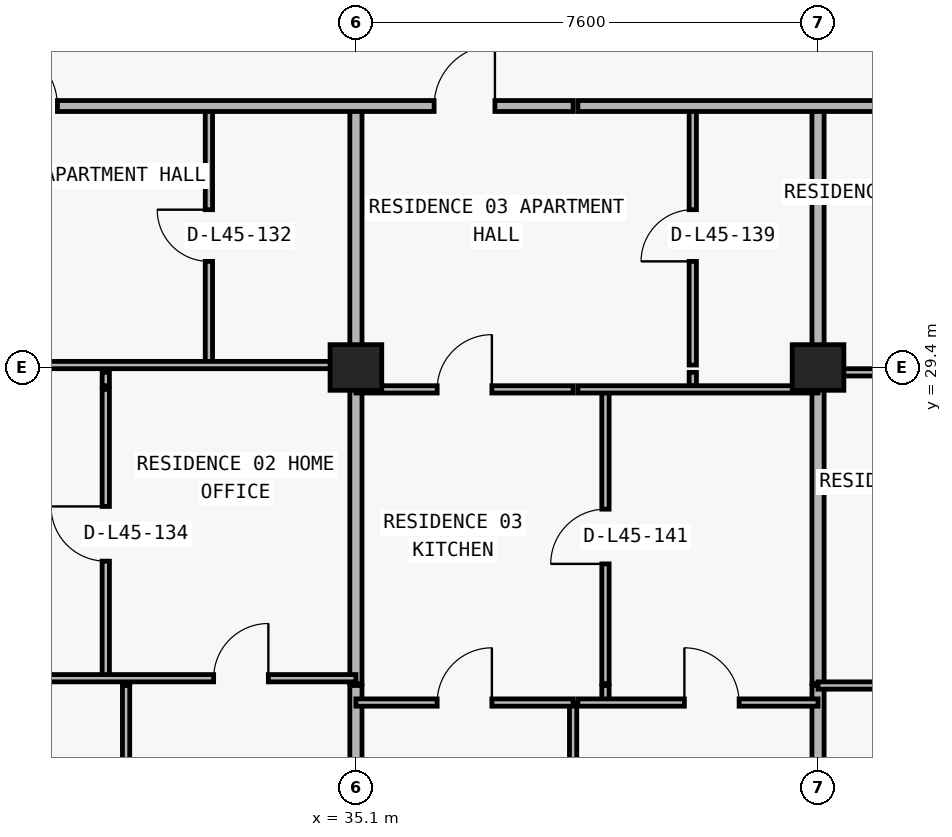
"""IFC4 building model, lengths in metres.
Left out: names, types, materials, properties, quantities, classifications, styles, units other than length and angle.
Written with IfcOpenShell. Run it as: python <this file> out.ifc"""

import sys

from ifc_helpers import new_model, si_unit, direction, frame, frame_2d, origin, origin_2d, place, context, subcontext, project, spatial, rectangle, extrude, element, fill, save


model = new_model("IFC4")
c1 = context("Model", 3, precision=1e-05, world=origin(), true_north=direction((0.0, 1.0)))
c2 = subcontext(c1, "Body", "Model", "MODEL_VIEW")
j1 = project(units=[si_unit("LENGTHUNIT", "METRE"), si_unit("PLANEANGLEUNIT", "RADIAN")], contexts=[c1])
p1 = place(None, origin())
s1 = spatial("IfcSite", under=j1, at=p1, CompositionType="ELEMENT")
p2 = place(p1, origin())
s2 = spatial("IfcBuilding", under=s1, at=p2, CompositionType="ELEMENT")
p3 = place(p2, frame((0.0, 0.0, 163.8)))
s3 = spatial("IfcBuildingStorey", under=s2, at=p3, CompositionType="ELEMENT", Elevation=163.8)
for number, where, z_axis, x_axis in (
    (1, (35.1, 29.4, 0.0), (0.0, 0.0, 1.0), (1.0, 0.0, 0.0)),
    (2, (42.7, 29.4, 0.0), (0.0, 0.0, 1.0), (1.0, 0.0, 0.0)),
):
    element("IfcColumn", number, at=place(p3, frame(where, z_axis=z_axis, x_axis=x_axis)), inside=s3, PredefinedType="COLUMN", context=c2, shape_type="SweptSolid", body=[
        extrude(rectangle(XDim=0.85, YDim=0.75, at=origin_2d()), origin(), (0.0, 0.0, 1.0), 3.05),
    ])
p4 = place(p3, frame((30.986, 24.29, 0.0), z_axis=(0.0, 0.0, 1.0), x_axis=(0.0, 1.0, 0.0)))
e3 = element("IfcWall", 3, at=p4, inside=s3, PredefinedType="PARTITIONING", context=c2, shape_type="SweptSolid", body=[
    extrude(rectangle(XDim=4.75, YDim=0.12, at=frame_2d((2.375, 0.0))), origin(), (0.0, 0.0, 1.0), 2.499),
])
p5 = place(p4, frame((1.925, 0.0, 0.0)))
e4 = element("IfcOpeningElement", 4, at=p5, cuts=e3, PredefinedType="OPENING", context=c2, shape_type="SweptSolid", body=[
    extrude(rectangle(XDim=0.9, YDim=2.15, at=frame_2d((0.45, 1.075))), frame((0.0, 0.07, 0.0), z_axis=(0.0, -1.0, 0.0), x_axis=(1.0, 0.0, 0.0)), (0.0, 0.0, 1.0), 0.14),
])
p6 = place(p3, frame((30.986, 29.1, 0.0), z_axis=(0.0, 0.0, 1.0), x_axis=(0.0, 1.0, 0.0)))
e5 = element("IfcWall", 5, at=p6, inside=s3, PredefinedType="PARTITIONING", context=c2, shape_type="SweptSolid", body=[
    extrude(rectangle(XDim=0.22, YDim=0.12, at=frame_2d((0.11, 0.0))), origin(), (0.0, 0.0, 1.0), 2.499),
])
p7 = place(p3, frame((31.32, 11.24, 0.0), z_axis=(0.0, 0.0, 1.0), x_axis=(0.0, 1.0, 0.0)))
e6 = element("IfcWall", 6, at=p7, inside=s3, PredefinedType="PARTITIONING", context=c2, shape_type="SweptSolid", body=[
    extrude(rectangle(XDim=12.93, YDim=0.12, at=frame_2d((6.465, 0.0))), origin(), (0.0, 0.0, 1.0), 3.05),
])
p8 = place(p3, frame((31.32, 24.2, 0.0), z_axis=(0.0, 0.0, 1.0), x_axis=(0.0, 1.0, 0.0)))
e7 = element("IfcWall", 7, at=p8, inside=s3, PredefinedType="PARTITIONING", context=c2, shape_type="SweptSolid", body=[
    extrude(rectangle(XDim=0.09, YDim=0.12, at=frame_2d((0.045, 0.0))), origin(), (0.0, 0.0, 1.0), 3.05),
])
p9 = place(p3, frame((32.682, 29.44, 0.0), z_axis=(0.0, 0.0, 1.0), x_axis=(0.0, 1.0, 0.0)))
e8 = element("IfcWall", 8, at=p9, inside=s3, PredefinedType="PARTITIONING", context=c2, shape_type="SweptSolid", body=[
    extrude(rectangle(XDim=4.26, YDim=0.12, at=frame_2d((2.13, 0.0))), origin(), (0.0, 0.0, 1.0), 3.05),
])
p10 = place(p9, frame((1.705, 0.0, 0.0)))
e9 = element("IfcOpeningElement", 9, at=p10, cuts=e8, PredefinedType="OPENING", context=c2, shape_type="SweptSolid", body=[
    extrude(rectangle(XDim=0.85, YDim=2.1, at=frame_2d((0.425, 1.05))), frame((0.0, 0.07, 0.0), z_axis=(0.0, -1.0, 0.0), x_axis=(1.0, 0.0, 0.0)), (0.0, 0.0, 1.0), 0.14),
])
p11 = place(p3, frame((35.1, 11.24, 0.0), z_axis=(0.0, 0.0, 1.0), x_axis=(0.0, 1.0, 0.0)))
e10 = element("IfcWall", 10, at=p11, inside=s3, PredefinedType="PARTITIONING", context=c2, shape_type="SweptSolid", body=[
    extrude(rectangle(XDim=12.93, YDim=0.2, at=frame_2d((6.465, 0.0))), origin(), (0.0, 0.0, 1.0), 2.263),
])
p12 = place(p3, frame((35.1, 24.2, 0.0), z_axis=(0.0, 0.0, 1.0), x_axis=(0.0, 1.0, 0.0)))
e11 = element("IfcWall", 11, at=p12, inside=s3, PredefinedType="PARTITIONING", context=c2, shape_type="SweptSolid", body=[
    extrude(rectangle(XDim=4.84, YDim=0.2, at=frame_2d((2.42, 0.0))), origin(), (0.0, 0.0, 1.0), 2.263),
])
p13 = place(p3, frame((35.1, 29.1, 0.0), z_axis=(0.0, 0.0, 1.0), x_axis=(0.0, 1.0, 0.0)))
e12 = element("IfcWall", 12, at=p13, inside=s3, PredefinedType="PARTITIONING", context=c2, shape_type="SweptSolid", body=[
    extrude(rectangle(XDim=0.22, YDim=0.2, at=frame_2d((0.11, 0.0))), origin(), (0.0, 0.0, 1.0), 3.05),
])
p14 = place(p3, frame((35.1, 29.44, 0.0), z_axis=(0.0, 0.0, 1.0), x_axis=(0.0, 1.0, 0.0)))
e13 = element("IfcWall", 13, at=p14, inside=s3, PredefinedType="PARTITIONING", context=c2, shape_type="SweptSolid", body=[
    extrude(rectangle(XDim=4.26, YDim=0.2, at=frame_2d((2.13, 0.0))), origin(), (0.0, 0.0, 1.0), 2.263),
])
p15 = place(p3, frame((38.672, 11.24, 0.0), z_axis=(0.0, 0.0, 1.0), x_axis=(0.0, 1.0, 0.0)))
e14 = element("IfcWall", 14, at=p15, inside=s3, PredefinedType="PARTITIONING", context=c2, shape_type="SweptSolid", body=[
    extrude(rectangle(XDim=12.65, YDim=0.12, at=frame_2d((6.325, 0.0))), origin(), (0.0, 0.0, 1.0), 2.499),
])
p16 = place(p3, frame((39.204, 23.89, 0.0), z_axis=(0.0, 0.0, 1.0), x_axis=(0.0, 1.0, 0.0)))
e15 = element("IfcWall", 15, at=p16, inside=s3, PredefinedType="PARTITIONING", context=c2, shape_type="SweptSolid", body=[
    extrude(rectangle(XDim=0.28, YDim=0.12, at=frame_2d((0.14, 0.0))), origin(), (0.0, 0.0, 1.0), 3.05),
])
p17 = place(p3, frame((39.204, 24.2, 0.0), z_axis=(0.0, 0.0, 1.0), x_axis=(0.0, 1.0, 0.0)))
e16 = element("IfcWall", 16, at=p17, inside=s3, PredefinedType="PARTITIONING", context=c2, shape_type="SweptSolid", body=[
    extrude(rectangle(XDim=4.84, YDim=0.12, at=frame_2d((2.42, 0.0))), origin(), (0.0, 0.0, 1.0), 3.05),
])
p18 = place(p17, frame((1.97, 0.0, 0.0)))
e17 = element("IfcOpeningElement", 17, at=p18, cuts=e16, PredefinedType="OPENING", context=c2, shape_type="SweptSolid", body=[
    extrude(rectangle(XDim=0.9, YDim=2.15, at=frame_2d((0.45, 1.075))), frame((0.0, 0.07, 0.0), z_axis=(0.0, -1.0, 0.0), x_axis=(1.0, 0.0, 0.0)), (0.0, 0.0, 1.0), 0.14),
])
p19 = place(p3, frame((40.64, 29.1, 0.0), z_axis=(0.0, 0.0, 1.0), x_axis=(0.0, 1.0, 0.0)))
e18 = element("IfcWall", 18, at=p19, inside=s3, PredefinedType="PARTITIONING", context=c2, shape_type="SweptSolid", body=[
    extrude(rectangle(XDim=0.22, YDim=0.12, at=frame_2d((0.11, 0.0))), origin(), (0.0, 0.0, 1.0), 3.05),
])
p20 = place(p3, frame((40.64, 29.44, 0.0), z_axis=(0.0, 0.0, 1.0), x_axis=(0.0, 1.0, 0.0)))
e19 = element("IfcWall", 19, at=p20, inside=s3, PredefinedType="PARTITIONING", context=c2, shape_type="SweptSolid", body=[
    extrude(rectangle(XDim=4.26, YDim=0.12, at=frame_2d((2.13, 0.0))), origin(), (0.0, 0.0, 1.0), 3.05),
])
p21 = place(p20, frame((1.705, 0.0, 0.0)))
e20 = element("IfcOpeningElement", 20, at=p21, cuts=e19, PredefinedType="OPENING", context=c2, shape_type="SweptSolid", body=[
    extrude(rectangle(XDim=0.85, YDim=2.1, at=frame_2d((0.425, 1.05))), frame((0.0, 0.07, 0.0), z_axis=(0.0, -1.0, 0.0), x_axis=(1.0, 0.0, 0.0)), (0.0, 0.0, 1.0), 0.14),
])
p22 = place(p3, frame((42.7, 11.24, 0.0), z_axis=(0.0, 0.0, 1.0), x_axis=(0.0, 1.0, 0.0)))
e21 = element("IfcWall", 21, at=p22, inside=s3, PredefinedType="PARTITIONING", context=c2, shape_type="SweptSolid", body=[
    extrude(rectangle(XDim=12.93, YDim=0.2, at=frame_2d((6.465, 0.0))), origin(), (0.0, 0.0, 1.0), 2.263),
])
p23 = place(p3, frame((42.7, 24.2, 0.0), z_axis=(0.0, 0.0, 1.0), x_axis=(0.0, 1.0, 0.0)))
e22 = element("IfcWall", 22, at=p23, inside=s3, PredefinedType="PARTITIONING", context=c2, shape_type="SweptSolid", body=[
    extrude(rectangle(XDim=4.84, YDim=0.2, at=frame_2d((2.42, 0.0))), origin(), (0.0, 0.0, 1.0), 2.263),
])
p24 = place(p3, frame((42.7, 29.1, 0.0), z_axis=(0.0, 0.0, 1.0), x_axis=(0.0, 1.0, 0.0)))
e23 = element("IfcWall", 23, at=p24, inside=s3, PredefinedType="PARTITIONING", context=c2, shape_type="SweptSolid", body=[
    extrude(rectangle(XDim=0.22, YDim=0.2, at=frame_2d((0.11, 0.0))), origin(), (0.0, 0.0, 1.0), 3.05),
])
p25 = place(p3, frame((42.7, 29.44, 0.0), z_axis=(0.0, 0.0, 1.0), x_axis=(0.0, 1.0, 0.0)))
e24 = element("IfcWall", 24, at=p25, inside=s3, PredefinedType="PARTITIONING", context=c2, shape_type="SweptSolid", body=[
    extrude(rectangle(XDim=4.26, YDim=0.2, at=frame_2d((2.13, 0.0))), origin(), (0.0, 0.0, 1.0), 2.263),
])
p26 = place(p3, frame((35.1, 23.89, 0.0), z_axis=(0.0, 0.0, 1.0), x_axis=(1.0, 0.0, 0.0)))
e25 = element("IfcWall", 25, at=p26, inside=s3, PredefinedType="PARTITIONING", context=c2, shape_type="SweptSolid", body=[
    extrude(rectangle(XDim=3.572, YDim=0.12, at=frame_2d((1.786, 0.0))), origin(), (0.0, 0.0, 1.0), 3.05),
])
p27 = place(p26, frame((1.336, 0.0, 0.0)))
e26 = element("IfcOpeningElement", 26, at=p27, cuts=e25, PredefinedType="OPENING", context=c2, shape_type="SweptSolid", body=[
    extrude(rectangle(XDim=0.9, YDim=2.15, at=frame_2d((0.45, 1.075))), frame((0.0, 0.07, 0.0), z_axis=(0.0, -1.0, 0.0), x_axis=(1.0, 0.0, 0.0)), (0.0, 0.0, 1.0), 0.14),
])
p28 = place(p3, frame((38.75, 23.89, 0.0), z_axis=(0.0, 0.0, 1.0), x_axis=(1.0, 0.0, 0.0)))
e27 = element("IfcWall", 27, at=p28, inside=s3, PredefinedType="PARTITIONING", context=c2, shape_type="SweptSolid", body=[
    extrude(rectangle(XDim=3.95, YDim=0.12, at=frame_2d((1.975, 0.0))), origin(), (0.0, 0.0, 1.0), 3.05),
])
p29 = place(p28, frame((1.752, 0.0, 0.0)))
e28 = element("IfcOpeningElement", 28, at=p29, cuts=e27, PredefinedType="OPENING", context=c2, shape_type="SweptSolid", body=[
    extrude(rectangle(XDim=0.9, YDim=2.15, at=frame_2d((0.45, 1.075))), frame((0.0, 0.07, 0.0), z_axis=(0.0, -1.0, 0.0), x_axis=(1.0, 0.0, 0.0)), (0.0, 0.0, 1.0), 0.14),
])
p30 = place(p3, frame((42.7, 24.17, 0.0), z_axis=(0.0, 0.0, 1.0), x_axis=(1.0, 0.0, 0.0)))
e29 = element("IfcWall", 29, at=p30, inside=s3, PredefinedType="PARTITIONING", context=c2, shape_type="SweptSolid", body=[
    extrude(rectangle(XDim=8.18, YDim=0.12, at=frame_2d((4.09, 0.0))), origin(), (0.0, 0.0, 1.0), 3.05),
])
p31 = place(p30, frame((1.86, 0.0, 0.0)))
e30 = element("IfcOpeningElement", 30, at=p31, cuts=e29, PredefinedType="OPENING", context=c2, shape_type="SweptSolid", body=[
    extrude(rectangle(XDim=0.9, YDim=2.15, at=frame_2d((0.45, 1.075))), frame((0.0, 0.07, 0.0), z_axis=(0.0, -1.0, 0.0), x_axis=(1.0, 0.0, 0.0)), (0.0, 0.0, 1.0), 0.14),
])
p32 = place(p30, frame((6.033, 0.0, 0.0)))
e31 = element("IfcOpeningElement", 31, at=p32, cuts=e29, PredefinedType="OPENING", context=c2, shape_type="SweptSolid", body=[
    extrude(rectangle(XDim=0.9, YDim=2.15, at=frame_2d((0.45, 1.075))), frame((0.0, 0.07, 0.0), z_axis=(0.0, -1.0, 0.0), x_axis=(1.0, 0.0, 0.0)), (0.0, 0.0, 1.0), 0.14),
])
p33 = place(p3, frame((26.92, 24.29, 0.0), z_axis=(0.0, 0.0, 1.0), x_axis=(1.0, 0.0, 0.0)))
e32 = element("IfcWall", 32, at=p33, inside=s3, PredefinedType="PARTITIONING", context=c2, shape_type="SweptSolid", body=[
    extrude(rectangle(XDim=8.18, YDim=0.12, at=frame_2d((4.09, 0.0))), origin(), (0.0, 0.0, 1.0), 3.05),
])
p34 = place(p33, frame((1.583, 0.0, 0.0)))
e33 = element("IfcOpeningElement", 33, at=p34, cuts=e32, PredefinedType="OPENING", context=c2, shape_type="SweptSolid", body=[
    extrude(rectangle(XDim=0.9, YDim=2.15, at=frame_2d((0.45, 1.075))), frame((0.0, 0.07, 0.0), z_axis=(0.0, -1.0, 0.0), x_axis=(1.0, 0.0, 0.0)), (0.0, 0.0, 1.0), 0.14),
])
p35 = place(p33, frame((5.84, 0.0, 0.0)))
e34 = element("IfcOpeningElement", 34, at=p35, cuts=e32, PredefinedType="OPENING", context=c2, shape_type="SweptSolid", body=[
    extrude(rectangle(XDim=0.9, YDim=2.15, at=frame_2d((0.45, 1.075))), frame((0.0, 0.07, 0.0), z_axis=(0.0, -1.0, 0.0), x_axis=(1.0, 0.0, 0.0)), (0.0, 0.0, 1.0), 0.14),
])
p36 = place(p3, frame((35.1, 29.04, 0.0), z_axis=(0.0, 0.0, 1.0), x_axis=(1.0, 0.0, 0.0)))
e35 = element("IfcWall", 35, at=p36, inside=s3, PredefinedType="PARTITIONING", context=c2, shape_type="SweptSolid", body=[
    extrude(rectangle(XDim=3.572, YDim=0.12, at=frame_2d((1.786, 0.0))), origin(), (0.0, 0.0, 1.0), 3.05),
])
p37 = place(p36, frame((1.336, 0.0, 0.0)))
e36 = element("IfcOpeningElement", 36, at=p37, cuts=e35, PredefinedType="OPENING", context=c2, shape_type="SweptSolid", body=[
    extrude(rectangle(XDim=0.9, YDim=2.15, at=frame_2d((0.45, 1.075))), frame((0.0, 0.07, 0.0), z_axis=(0.0, -1.0, 0.0), x_axis=(1.0, 0.0, 0.0)), (0.0, 0.0, 1.0), 0.14),
])
p38 = place(p3, frame((38.75, 29.04, 0.0), z_axis=(0.0, 0.0, 1.0), x_axis=(1.0, 0.0, 0.0)))
e37 = element("IfcWall", 37, at=p38, inside=s3, PredefinedType="PARTITIONING", context=c2, shape_type="SweptSolid", body=[
    extrude(rectangle(XDim=3.95, YDim=0.12, at=frame_2d((1.975, 0.0))), origin(), (0.0, 0.0, 1.0), 3.05),
])
p39 = place(p3, frame((42.7, 29.32, 0.0), z_axis=(0.0, 0.0, 1.0), x_axis=(1.0, 0.0, 0.0)))
e38 = element("IfcWall", 38, at=p39, inside=s3, PredefinedType="PARTITIONING", context=c2, shape_type="SweptSolid", body=[
    extrude(rectangle(XDim=8.18, YDim=0.12, at=frame_2d((4.09, 0.0))), origin(), (0.0, 0.0, 1.0), 2.263),
])
p40 = place(p39, frame((1.943, 0.0, 0.0)))
e39 = element("IfcOpeningElement", 39, at=p40, cuts=e38, PredefinedType="OPENING", context=c2, shape_type="SweptSolid", body=[
    extrude(rectangle(XDim=0.9, YDim=2.15, at=frame_2d((0.45, 1.075))), frame((0.0, 0.07, 0.0), z_axis=(0.0, -1.0, 0.0), x_axis=(1.0, 0.0, 0.0)), (0.0, 0.0, 1.0), 0.14),
])
p41 = place(p3, frame((26.92, 29.44, 0.0), z_axis=(0.0, 0.0, 1.0), x_axis=(1.0, 0.0, 0.0)))
e40 = element("IfcWall", 40, at=p41, inside=s3, PredefinedType="PARTITIONING", context=c2, shape_type="SweptSolid", body=[
    extrude(rectangle(XDim=8.18, YDim=0.12, at=frame_2d((4.09, 0.0))), origin(), (0.0, 0.0, 1.0), 2.263),
])
p42 = place(p41, frame((1.583, 0.0, 0.0)))
e41 = element("IfcOpeningElement", 41, at=p42, cuts=e40, PredefinedType="OPENING", context=c2, shape_type="SweptSolid", body=[
    extrude(rectangle(XDim=0.9, YDim=2.15, at=frame_2d((0.45, 1.075))), frame((0.0, 0.07, 0.0), z_axis=(0.0, -1.0, 0.0), x_axis=(1.0, 0.0, 0.0)), (0.0, 0.0, 1.0), 0.14),
])
p43 = place(p3, frame((18.3, 33.7, 0.0), z_axis=(0.0, 0.0, 1.0), x_axis=(1.0, 0.0, 0.0)))
e42 = element("IfcWall", 42, at=p43, inside=s3, PredefinedType="PARTITIONING", context=c2, shape_type="SweptSolid", body=[
    extrude(rectangle(XDim=20.372, YDim=0.18, at=frame_2d((10.186, 0.0))), origin(), (0.0, 0.0, 1.0), 3.05),
])
p44 = place(p43, frame((10.891, 0.0, 0.0)))
e43 = element("IfcOpeningElement", 43, at=p44, cuts=e42, PredefinedType="OPENING", context=c2, shape_type="SweptSolid", body=[
    extrude(rectangle(XDim=1.0, YDim=2.2, at=frame_2d((0.5, 1.1))), frame((0.0, 0.1, 0.0), z_axis=(0.0, -1.0, 0.0), x_axis=(1.0, 0.0, 0.0)), (0.0, 0.0, 1.0), 0.2),
])
p45 = place(p43, frame((18.086, 0.0, 0.0)))
e44 = element("IfcOpeningElement", 44, at=p45, cuts=e42, PredefinedType="OPENING", context=c2, shape_type="SweptSolid", body=[
    extrude(rectangle(XDim=1.0, YDim=2.2, at=frame_2d((0.5, 1.1))), frame((0.0, 0.1, 0.0), z_axis=(0.0, -1.0, 0.0), x_axis=(1.0, 0.0, 0.0)), (0.0, 0.0, 1.0), 0.2),
])
p46 = place(p3, frame((38.75, 33.7, 0.0), z_axis=(0.0, 0.0, 1.0), x_axis=(1.0, 0.0, 0.0)))
e45 = element("IfcWall", 45, at=p46, inside=s3, PredefinedType="PARTITIONING", context=c2, shape_type="SweptSolid", body=[
    extrude(rectangle(XDim=20.75, YDim=0.18, at=frame_2d((10.375, 0.0))), origin(), (0.0, 0.0, 1.0), 3.05),
])
p47 = place(p46, frame((6.474, 0.0, 0.0)))
e46 = element("IfcOpeningElement", 46, at=p47, cuts=e45, PredefinedType="OPENING", context=c2, shape_type="SweptSolid", body=[
    extrude(rectangle(XDim=1.0, YDim=2.2, at=frame_2d((0.5, 1.1))), frame((0.0, 0.1, 0.0), z_axis=(0.0, -1.0, 0.0), x_axis=(1.0, 0.0, 0.0)), (0.0, 0.0, 1.0), 0.2),
])
p48 = place(p46, frame((14.999, 0.0, 0.0)))
e47 = element("IfcOpeningElement", 47, at=p48, cuts=e45, PredefinedType="OPENING", context=c2, shape_type="SweptSolid", body=[
    extrude(rectangle(XDim=1.0, YDim=2.2, at=frame_2d((0.5, 1.1))), frame((0.0, 0.1, 0.0), z_axis=(0.0, -1.0, 0.0), x_axis=(1.0, 0.0, 0.0)), (0.0, 0.0, 1.0), 0.2),
])
p49 = place(p44, origin())
e48 = element("IfcDoor", 48, at=p49, inside=s3, OperationType="SINGLE_SWING_LEFT", PredefinedType="DOOR", context=c2, shape_type="SweptSolid", body=[
    extrude(rectangle(XDim=1.0, YDim=2.2, at=frame_2d((0.5, 1.1))), frame((0.0, 0.025, 0.0), z_axis=(0.0, -1.0, 0.0), x_axis=(1.0, 0.0, 0.0)), (0.0, 0.0, 1.0), 0.05),
])
fill(e43, e48)
p50 = place(p10, origin())
e49 = element("IfcDoor", 49, at=p50, inside=s3, OperationType="SINGLE_SWING_RIGHT", PredefinedType="DOOR", context=c2, shape_type="SweptSolid", body=[
    extrude(rectangle(XDim=0.85, YDim=2.1, at=frame_2d((0.425, 1.05))), frame((0.0, 0.025, 0.0), z_axis=(0.0, -1.0, 0.0), x_axis=(1.0, 0.0, 0.0)), (0.0, 0.0, 1.0), 0.05),
])
fill(e9, e49)
p51 = place(p5, origin())
e50 = element("IfcDoor", 50, at=p51, inside=s3, OperationType="SINGLE_SWING_RIGHT", PredefinedType="DOOR", context=c2, shape_type="SweptSolid", body=[
    extrude(rectangle(XDim=0.9, YDim=2.15, at=frame_2d((0.45, 1.075))), frame((0.0, 0.025, 0.0), z_axis=(0.0, -1.0, 0.0), x_axis=(1.0, 0.0, 0.0)), (0.0, 0.0, 1.0), 0.05),
])
fill(e4, e50)
p52 = place(p35, origin())
e51 = element("IfcDoor", 51, at=p52, inside=s3, OperationType="SINGLE_SWING_RIGHT", PredefinedType="DOOR", context=c2, shape_type="SweptSolid", body=[
    extrude(rectangle(XDim=0.9, YDim=2.15, at=frame_2d((0.45, 1.075))), frame((0.0, 0.025, 0.0), z_axis=(0.0, -1.0, 0.0), x_axis=(1.0, 0.0, 0.0)), (0.0, 0.0, 1.0), 0.05),
])
fill(e34, e51)
p53 = place(p45, origin())
e52 = element("IfcDoor", 52, at=p53, inside=s3, OperationType="SINGLE_SWING_RIGHT", PredefinedType="DOOR", context=c2, shape_type="SweptSolid", body=[
    extrude(rectangle(XDim=1.0, YDim=2.2, at=frame_2d((0.5, 1.1))), frame((0.0, 0.025, 0.0), z_axis=(0.0, -1.0, 0.0), x_axis=(1.0, 0.0, 0.0)), (0.0, 0.0, 1.0), 0.05),
])
fill(e44, e52)
p54 = place(p21, origin())
e53 = element("IfcDoor", 53, at=p54, inside=s3, OperationType="SINGLE_SWING_LEFT", PredefinedType="DOOR", context=c2, shape_type="SweptSolid", body=[
    extrude(rectangle(XDim=0.85, YDim=2.1, at=frame_2d((0.425, 1.05))), frame((0.0, 0.025, 0.0), z_axis=(0.0, -1.0, 0.0), x_axis=(1.0, 0.0, 0.0)), (0.0, 0.0, 1.0), 0.05),
])
fill(e20, e53)
p55 = place(p37, origin())
e54 = element("IfcDoor", 54, at=p55, inside=s3, OperationType="SINGLE_SWING_RIGHT", PredefinedType="DOOR", context=c2, shape_type="SweptSolid", body=[
    extrude(rectangle(XDim=0.9, YDim=2.15, at=frame_2d((0.45, 1.075))), frame((0.0, 0.025, 0.0), z_axis=(0.0, -1.0, 0.0), x_axis=(1.0, 0.0, 0.0)), (0.0, 0.0, 1.0), 0.05),
])
fill(e36, e54)
p56 = place(p18, origin())
e55 = element("IfcDoor", 55, at=p56, inside=s3, OperationType="SINGLE_SWING_LEFT", PredefinedType="DOOR", context=c2, shape_type="SweptSolid", body=[
    extrude(rectangle(XDim=0.9, YDim=2.15, at=frame_2d((0.45, 1.075))), frame((0.0, 0.025, 0.0), z_axis=(0.0, -1.0, 0.0), x_axis=(1.0, 0.0, 0.0)), (0.0, 0.0, 1.0), 0.05),
])
fill(e17, e55)
p57 = place(p27, origin())
e56 = element("IfcDoor", 56, at=p57, inside=s3, OperationType="SINGLE_SWING_RIGHT", PredefinedType="DOOR", context=c2, shape_type="SweptSolid", body=[
    extrude(rectangle(XDim=0.9, YDim=2.15, at=frame_2d((0.45, 1.075))), frame((0.0, 0.025, 0.0), z_axis=(0.0, -1.0, 0.0), x_axis=(1.0, 0.0, 0.0)), (0.0, 0.0, 1.0), 0.05),
])
fill(e26, e56)
p58 = place(p29, origin())
e57 = element("IfcDoor", 57, at=p58, inside=s3, OperationType="SINGLE_SWING_LEFT", PredefinedType="DOOR", context=c2, shape_type="SweptSolid", body=[
    extrude(rectangle(XDim=0.9, YDim=2.15, at=frame_2d((0.45, 1.075))), frame((0.0, 0.025, 0.0), z_axis=(0.0, -1.0, 0.0), x_axis=(1.0, 0.0, 0.0)), (0.0, 0.0, 1.0), 0.05),
])
fill(e28, e57)
save(model, sys.argv[1])
